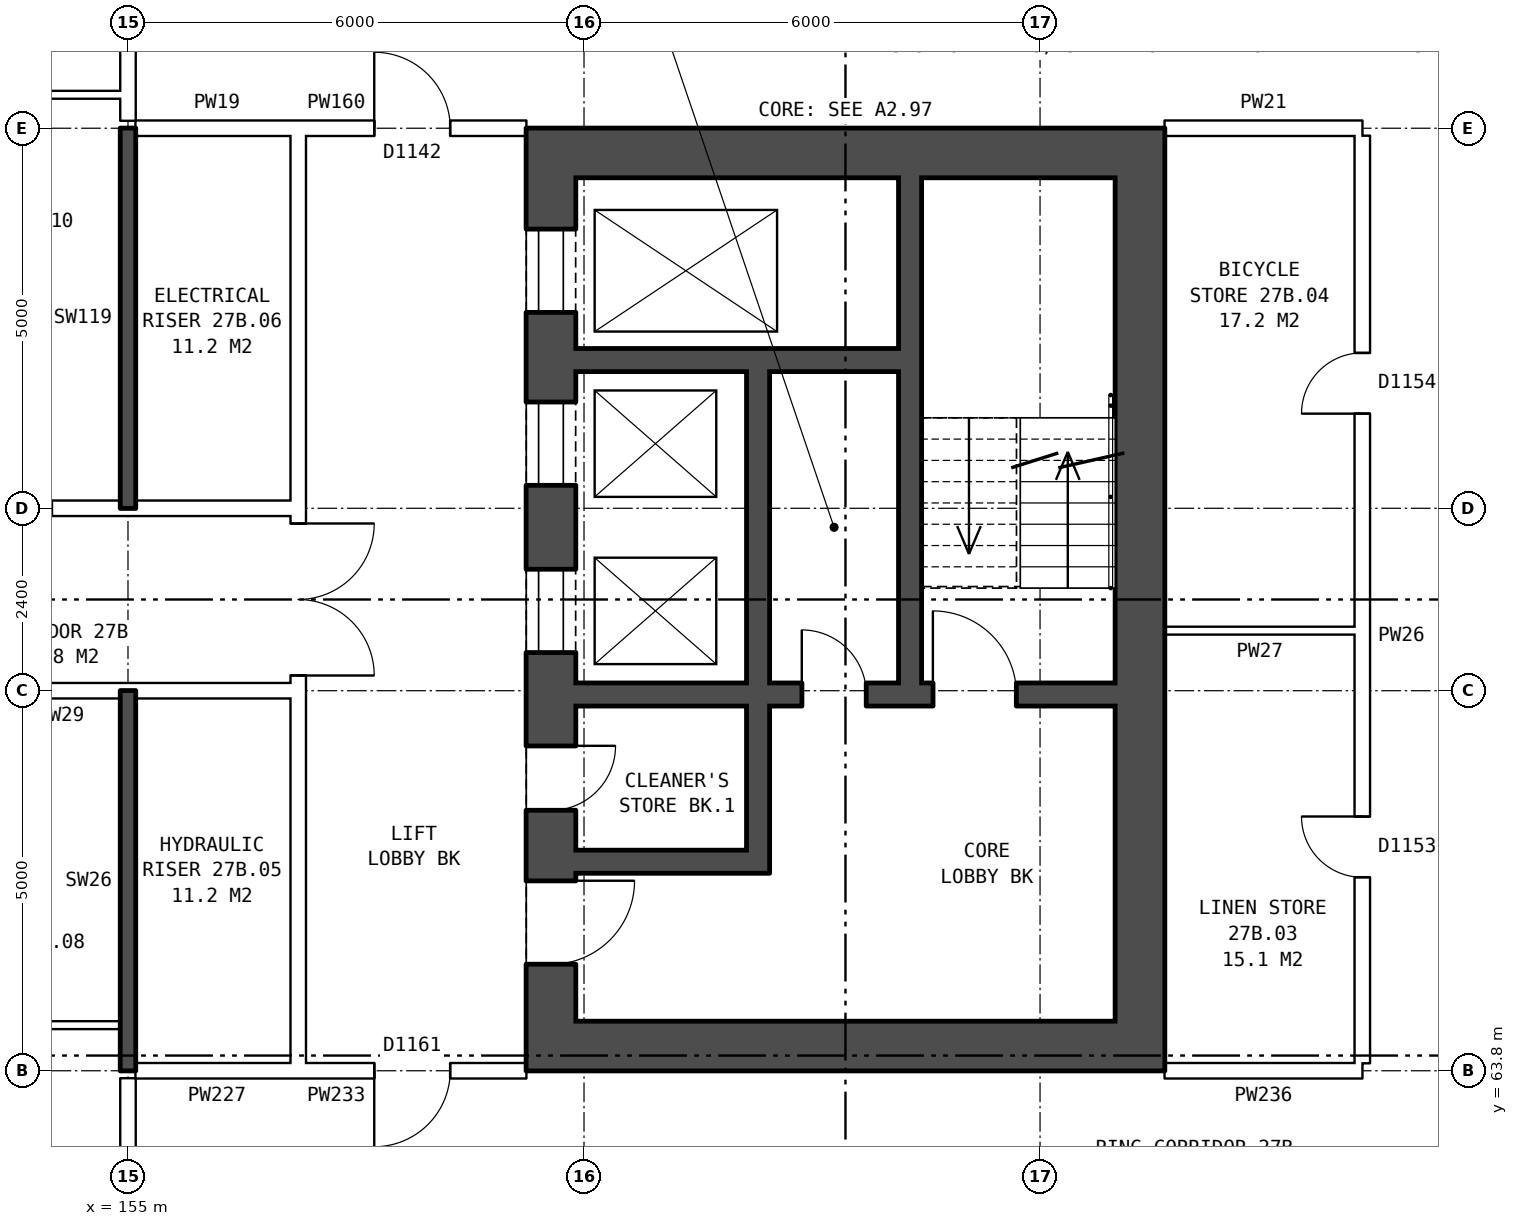
"""IFC4 building model, lengths in metres.
Left out: names, types, materials, properties, quantities, classifications, styles, units other than length and angle.
Written with IfcOpenShell. Run it as: python <this file> out.ifc"""

import sys

from ifc_helpers import new_model, si_unit, direction, frame, frame_2d, origin, place, context, subcontext, project, spatial, rectangle, extrude, element, fill, save


model = new_model("IFC4")
c1 = context("Model", 3, precision=1e-05, world=origin(), true_north=direction((0.0, 1.0)))
c2 = subcontext(c1, "Body", "Model", "MODEL_VIEW")
j1 = project(units=[si_unit("LENGTHUNIT", "METRE"), si_unit("PLANEANGLEUNIT", "RADIAN")], contexts=[c1])
p1 = place(None, origin())
s1 = spatial("IfcSite", under=j1, at=p1, CompositionType="ELEMENT")
p2 = place(p1, origin())
s2 = spatial("IfcBuilding", under=s1, at=p2, CompositionType="ELEMENT")
p3 = place(p2, frame((0.0, 0.0, 99.5)))
s3 = spatial("IfcBuildingStorey", under=s2, at=p3, CompositionType="ELEMENT", Elevation=99.5)
p4 = place(p3, frame((160.565, 75.55, 0.0), z_axis=(0.0, 0.0, 1.0), x_axis=(0.0, -1.0, 0.0)))
e1 = element("IfcWall", 1, at=p4, inside=s3, PredefinedType="SHEAR", context=c2, shape_type="SweptSolid", body=[
    extrude(rectangle(XDim=11.1, YDim=0.65, at=frame_2d((5.55, 0.0))), origin(), (0.0, 0.0, 1.0), 2.85),
])
p5 = place(p4, frame((0.675, 0.0, 0.0)))
e2 = element("IfcOpeningElement", 2, at=p5, cuts=e1, PredefinedType="OPENING", context=c2, shape_type="SweptSolid", body=[
    extrude(rectangle(XDim=1.1, YDim=2.1, at=frame_2d((0.55, 1.05))), frame((0.0, 0.335, 0.0), z_axis=(0.0, -1.0, 0.0), x_axis=(1.0, 0.0, 0.0)), (0.0, 0.0, 1.0), 0.67),
])
p6 = place(p4, frame((2.95, 0.0, 0.0)))
e3 = element("IfcOpeningElement", 3, at=p6, cuts=e1, PredefinedType="OPENING", context=c2, shape_type="SweptSolid", body=[
    extrude(rectangle(XDim=1.1, YDim=2.1, at=frame_2d((0.55, 1.05))), frame((0.0, 0.335, 0.0), z_axis=(0.0, -1.0, 0.0), x_axis=(1.0, 0.0, 0.0)), (0.0, 0.0, 1.0), 0.67),
])
p7 = place(p4, frame((5.15, 0.0, 0.0)))
e4 = element("IfcOpeningElement", 4, at=p7, cuts=e1, PredefinedType="OPENING", context=c2, shape_type="SweptSolid", body=[
    extrude(rectangle(XDim=1.1, YDim=2.1, at=frame_2d((0.55, 1.05))), frame((0.0, 0.335, 0.0), z_axis=(0.0, -1.0, 0.0), x_axis=(1.0, 0.0, 0.0)), (0.0, 0.0, 1.0), 0.67),
])
p8 = place(p4, frame((9.25, 0.0, 0.0)))
e5 = element("IfcOpeningElement", 5, at=p8, cuts=e1, PredefinedType="OPENING", context=c2, shape_type="SweptSolid", body=[
    extrude(rectangle(XDim=1.1, YDim=2.1, at=frame_2d((0.55, 1.05))), frame((0.0, 0.335, 0.0), z_axis=(0.0, -1.0, 0.0), x_axis=(1.0, 0.0, 0.0)), (0.0, 0.0, 1.0), 0.67),
])
p9 = place(p4, frame((7.475, 0.0, 0.0)))
e6 = element("IfcOpeningElement", 6, at=p9, cuts=e1, PredefinedType="OPENING", context=c2, shape_type="SweptSolid", body=[
    extrude(rectangle(XDim=0.85, YDim=2.1, at=frame_2d((0.425, 1.05))), frame((0.0, 0.335, 0.0), z_axis=(0.0, -1.0, 0.0), x_axis=(1.0, 0.0, 0.0)), (0.0, 0.0, 1.0), 0.67),
])
p10 = place(p3, frame((168.315, 75.55, 0.0), z_axis=(0.0, 0.0, 1.0), x_axis=(0.0, -1.0, 0.0)))
e7 = element("IfcWall", 7, at=p10, inside=s3, PredefinedType="SHEAR", context=c2, shape_type="SweptSolid", body=[
    extrude(rectangle(XDim=11.1, YDim=0.65, at=frame_2d((5.55, 0.0))), origin(), (0.0, 0.0, 1.0), 2.85),
])
for number, where, z_axis, x_axis in (
    (8, (160.24, 75.875, 0.0), (0.0, 0.0, 1.0), (1.0, 0.0, 0.0)),
    (9, (160.24, 64.125, 0.0), (0.0, 0.0, 1.0), (1.0, 0.0, 0.0)),
):
    element("IfcWall", number, at=place(p3, frame(where, z_axis=z_axis, x_axis=x_axis)), inside=s3, PredefinedType="SHEAR", context=c2, shape_type="SweptSolid", body=[
        extrude(rectangle(XDim=8.4, YDim=0.65, at=frame_2d((4.2, 0.0))), origin(), (0.0, 0.0, 1.0), 2.85),
    ])
p11 = place(p3, frame((160.89, 73.15, 0.0), z_axis=(0.0, 0.0, 1.0), x_axis=(1.0, 0.0, 0.0)))
e10 = element("IfcWall", 10, at=p11, inside=s3, PredefinedType="SHEAR", context=c2, shape_type="SweptSolid", body=[
    extrude(rectangle(XDim=4.25, YDim=0.3, at=frame_2d((2.125, 0.0))), origin(), (0.0, 0.0, 1.0), 2.85),
])
p12 = place(p3, frame((160.89, 68.75, 0.0), z_axis=(0.0, 0.0, 1.0), x_axis=(1.0, 0.0, 0.0)))
e11 = element("IfcWall", 11, at=p12, inside=s3, PredefinedType="SHEAR", context=c2, shape_type="SweptSolid", body=[
    extrude(rectangle(XDim=7.1, YDim=0.3, at=frame_2d((3.55, 0.0))), origin(), (0.0, 0.0, 1.0), 2.85),
])
p13 = place(p12, frame((4.7, 0.0, 0.0)))
e12 = element("IfcOpeningElement", 12, at=p13, cuts=e11, PredefinedType="OPENING", context=c2, shape_type="SweptSolid", body=[
    extrude(rectangle(XDim=1.1, YDim=2.1, at=frame_2d((0.55, 1.05))), frame((0.0, 0.16, 0.0), z_axis=(0.0, -1.0, 0.0), x_axis=(1.0, 0.0, 0.0)), (0.0, 0.0, 1.0), 0.32),
])
p14 = place(p12, frame((2.975, 0.0, 0.0)))
e13 = element("IfcOpeningElement", 13, at=p14, cuts=e11, PredefinedType="OPENING", context=c2, shape_type="SweptSolid", body=[
    extrude(rectangle(XDim=0.85, YDim=2.1, at=frame_2d((0.425, 1.05))), frame((0.0, 0.16, 0.0), z_axis=(0.0, -1.0, 0.0), x_axis=(1.0, 0.0, 0.0)), (0.0, 0.0, 1.0), 0.32),
])
p15 = place(p3, frame((160.89, 66.55, 0.0), z_axis=(0.0, 0.0, 1.0), x_axis=(1.0, 0.0, 0.0)))
e14 = element("IfcWall", 14, at=p15, inside=s3, PredefinedType="SHEAR", context=c2, shape_type="SweptSolid", body=[
    extrude(rectangle(XDim=2.25, YDim=0.3, at=frame_2d((1.125, 0.0))), origin(), (0.0, 0.0, 1.0), 2.85),
])
p16 = place(p3, frame((163.29, 73.0, 0.0), z_axis=(0.0, 0.0, 1.0), x_axis=(0.0, -1.0, 0.0)))
e15 = element("IfcWall", 15, at=p16, inside=s3, PredefinedType="SHEAR", context=c2, shape_type="SweptSolid", body=[
    extrude(rectangle(XDim=4.1, YDim=0.3, at=frame_2d((2.05, 0.0))), origin(), (0.0, 0.0, 1.0), 2.85),
])
p17 = place(p3, frame((163.29, 68.6, 0.0), z_axis=(0.0, 0.0, 1.0), x_axis=(0.0, -1.0, 0.0)))
e16 = element("IfcWall", 16, at=p17, inside=s3, PredefinedType="SHEAR", context=c2, shape_type="SweptSolid", body=[
    extrude(rectangle(XDim=2.2, YDim=0.3, at=frame_2d((1.1, 0.0))), origin(), (0.0, 0.0, 1.0), 2.85),
])
p18 = place(p3, frame((165.29, 75.55, 0.0), z_axis=(0.0, 0.0, 1.0), x_axis=(0.0, -1.0, 0.0)))
e17 = element("IfcWall", 17, at=p18, inside=s3, PredefinedType="SHEAR", context=c2, shape_type="SweptSolid", body=[
    extrude(rectangle(XDim=6.65, YDim=0.3, at=frame_2d((3.325, 0.0))), origin(), (0.0, 0.0, 1.0), 2.85),
])
p19 = place(p3, frame((157.24, 63.9, 0.0), z_axis=(0.0, 0.0, 1.0), x_axis=(0.0, 1.0, 0.0)))
e18 = element("IfcWall", 18, at=p19, inside=s3, PredefinedType="PARTITIONING", context=c2, shape_type="SweptSolid", body=[
    extrude(rectangle(XDim=12.2, YDim=0.2, at=frame_2d((6.1, 0.0))), origin(), (0.0, 0.0, 1.0), 2.85),
])
p20 = place(p19, frame((5.1, 0.0, 0.0)))
e19 = element("IfcOpeningElement", 19, at=p20, cuts=e18, PredefinedType="OPENING", context=c2, shape_type="SweptSolid", body=[
    extrude(rectangle(XDim=2.0, YDim=2.1, at=frame_2d((1.0, 1.05))), frame((0.0, 0.11, 0.0), z_axis=(0.0, -1.0, 0.0), x_axis=(1.0, 0.0, 0.0)), (0.0, 0.0, 1.0), 0.22),
])
p21 = place(p3, frame((155.1, 63.8, 0.0), z_axis=(0.0, 0.0, 1.0), x_axis=(1.0, 0.0, 0.0)))
e20 = element("IfcWall", 20, at=p21, inside=s3, PredefinedType="PARTITIONING", context=c2, shape_type="SweptSolid", body=[
    extrude(rectangle(XDim=2.14, YDim=0.2, at=frame_2d((1.07, 0.0))), origin(), (0.0, 0.0, 1.0), 2.85),
])
p22 = place(p3, frame((157.24, 63.8, 0.0), z_axis=(0.0, 0.0, 1.0), x_axis=(1.0, 0.0, 0.0)))
e21 = element("IfcWall", 21, at=p22, inside=s3, PredefinedType="PARTITIONING", context=c2, shape_type="SweptSolid", body=[
    extrude(rectangle(XDim=3.0, YDim=0.2, at=frame_2d((1.5, 0.0))), origin(), (0.0, 0.0, 1.0), 2.85),
])
p23 = place(p22, frame((1.0, 0.0, 0.0)))
e22 = element("IfcOpeningElement", 22, at=p23, cuts=e21, PredefinedType="OPENING", context=c2, shape_type="SweptSolid", body=[
    extrude(rectangle(XDim=1.0, YDim=2.1, at=frame_2d((0.5, 1.05))), frame((0.0, 0.11, 0.0), z_axis=(0.0, -1.0, 0.0), x_axis=(1.0, 0.0, 0.0)), (0.0, 0.0, 1.0), 0.22),
])
p24 = place(p3, frame((168.64, 63.8, 0.0), z_axis=(0.0, 0.0, 1.0), x_axis=(1.0, 0.0, 0.0)))
e23 = element("IfcWall", 23, at=p24, inside=s3, PredefinedType="PARTITIONING", context=c2, shape_type="SweptSolid", body=[
    extrude(rectangle(XDim=2.6, YDim=0.2, at=frame_2d((1.3, 0.0))), origin(), (0.0, 0.0, 1.0), 2.85),
])
p25 = place(p3, frame((152.0, 64.4, 0.0), z_axis=(0.0, 0.0, 1.0), x_axis=(1.0, 0.0, 0.0)))
e24 = element("IfcWall", 24, at=p25, inside=s3, PredefinedType="PARTITIONING", context=c2, shape_type="SweptSolid", body=[
    extrude(rectangle(XDim=2.9, YDim=0.1, at=frame_2d((1.45, 0.0))), origin(), (0.0, 0.0, 1.0), 2.85),
])
p26 = place(p3, frame((142.76, 68.8, 0.0), z_axis=(0.0, 0.0, 1.0), x_axis=(1.0, 0.0, 0.0)))
e25 = element("IfcWall", 25, at=p26, inside=s3, PredefinedType="PARTITIONING", context=c2, shape_type="SweptSolid", body=[
    extrude(rectangle(XDim=14.48, YDim=0.2, at=frame_2d((7.24, 0.0))), origin(), (0.0, 0.0, 1.0), 2.85),
])
p27 = place(p26, frame((4.24, 0.0, 0.0)))
e26 = element("IfcOpeningElement", 26, at=p27, cuts=e25, PredefinedType="OPENING", context=c2, shape_type="SweptSolid", body=[
    extrude(rectangle(XDim=1.0, YDim=2.1, at=frame_2d((0.5, 1.05))), frame((0.0, 0.11, 0.0), z_axis=(0.0, -1.0, 0.0), x_axis=(1.0, 0.0, 0.0)), (0.0, 0.0, 1.0), 0.22),
])
p28 = place(p26, frame((7.24, 0.0, 0.0)))
e27 = element("IfcOpeningElement", 27, at=p28, cuts=e25, PredefinedType="OPENING", context=c2, shape_type="SweptSolid", body=[
    extrude(rectangle(XDim=1.0, YDim=2.1, at=frame_2d((0.5, 1.05))), frame((0.0, 0.11, 0.0), z_axis=(0.0, -1.0, 0.0), x_axis=(1.0, 0.0, 0.0)), (0.0, 0.0, 1.0), 0.22),
])
p29 = place(p3, frame((168.64, 69.59, 0.0), z_axis=(0.0, 0.0, 1.0), x_axis=(1.0, 0.0, 0.0)))
e28 = element("IfcWall", 28, at=p29, inside=s3, PredefinedType="PARTITIONING", context=c2, shape_type="SweptSolid", body=[
    extrude(rectangle(XDim=2.5, YDim=0.1, at=frame_2d((1.25, 0.0))), origin(), (0.0, 0.0, 1.0), 2.85),
])
p30 = place(p3, frame((142.76, 71.2, 0.0), z_axis=(0.0, 0.0, 1.0), x_axis=(1.0, 0.0, 0.0)))
e29 = element("IfcWall", 29, at=p30, inside=s3, PredefinedType="PARTITIONING", context=c2, shape_type="SweptSolid", body=[
    extrude(rectangle(XDim=14.48, YDim=0.2, at=frame_2d((7.24, 0.0))), origin(), (0.0, 0.0, 1.0), 2.85),
])
p31 = place(p30, frame((1.12, 0.0, 0.0)))
e30 = element("IfcOpeningElement", 30, at=p31, cuts=e29, PredefinedType="OPENING", context=c2, shape_type="SweptSolid", body=[
    extrude(rectangle(XDim=1.0, YDim=2.1, at=frame_2d((0.5, 1.05))), frame((0.0, 0.11, 0.0), z_axis=(0.0, -1.0, 0.0), x_axis=(1.0, 0.0, 0.0)), (0.0, 0.0, 1.0), 0.22),
])
p32 = place(p30, frame((10.24, 0.0, 0.0)))
e31 = element("IfcOpeningElement", 31, at=p32, cuts=e29, PredefinedType="OPENING", context=c2, shape_type="SweptSolid", body=[
    extrude(rectangle(XDim=1.0, YDim=2.1, at=frame_2d((0.5, 1.05))), frame((0.0, 0.11, 0.0), z_axis=(0.0, -1.0, 0.0), x_axis=(1.0, 0.0, 0.0)), (0.0, 0.0, 1.0), 0.22),
])
p33 = place(p3, frame((155.1, 76.2, 0.0), z_axis=(0.0, 0.0, 1.0), x_axis=(1.0, 0.0, 0.0)))
e32 = element("IfcWall", 32, at=p33, inside=s3, PredefinedType="PARTITIONING", context=c2, shape_type="SweptSolid", body=[
    extrude(rectangle(XDim=2.14, YDim=0.2, at=frame_2d((1.07, 0.0))), origin(), (0.0, 0.0, 1.0), 2.85),
])
p34 = place(p3, frame((157.24, 76.2, 0.0), z_axis=(0.0, 0.0, 1.0), x_axis=(1.0, 0.0, 0.0)))
e33 = element("IfcWall", 33, at=p34, inside=s3, PredefinedType="PARTITIONING", context=c2, shape_type="SweptSolid", body=[
    extrude(rectangle(XDim=3.0, YDim=0.2, at=frame_2d((1.5, 0.0))), origin(), (0.0, 0.0, 1.0), 2.85),
])
p35 = place(p34, frame((1.0, 0.0, 0.0)))
e34 = element("IfcOpeningElement", 34, at=p35, cuts=e33, PredefinedType="OPENING", context=c2, shape_type="SweptSolid", body=[
    extrude(rectangle(XDim=1.0, YDim=2.1, at=frame_2d((0.5, 1.05))), frame((0.0, 0.11, 0.0), z_axis=(0.0, -1.0, 0.0), x_axis=(1.0, 0.0, 0.0)), (0.0, 0.0, 1.0), 0.22),
])
p36 = place(p3, frame((168.64, 76.2, 0.0), z_axis=(0.0, 0.0, 1.0), x_axis=(1.0, 0.0, 0.0)))
e35 = element("IfcWall", 35, at=p36, inside=s3, PredefinedType="PARTITIONING", context=c2, shape_type="SweptSolid", body=[
    extrude(rectangle(XDim=2.6, YDim=0.2, at=frame_2d((1.3, 0.0))), origin(), (0.0, 0.0, 1.0), 2.85),
])
p37 = place(p3, frame((152.0, 76.64, 0.0), z_axis=(0.0, 0.0, 1.0), x_axis=(1.0, 0.0, 0.0)))
e36 = element("IfcWall", 36, at=p37, inside=s3, PredefinedType="PARTITIONING", context=c2, shape_type="SweptSolid", body=[
    extrude(rectangle(XDim=2.9, YDim=0.1, at=frame_2d((1.45, 0.0))), origin(), (0.0, 0.0, 1.0), 2.85),
])
p38 = place(p37, frame((1.0, 0.0, 0.0)))
e37 = element("IfcOpeningElement", 37, at=p38, cuts=e36, PredefinedType="OPENING", context=c2, shape_type="SweptSolid", body=[
    extrude(rectangle(XDim=0.9, YDim=2.1, at=frame_2d((0.45, 1.05))), frame((0.0, 0.06, 0.0), z_axis=(0.0, -1.0, 0.0), x_axis=(1.0, 0.0, 0.0)), (0.0, 0.0, 1.0), 0.12),
])
p39 = place(p3, frame((155.0, 61.5, 0.0), z_axis=(0.0, 0.0, 1.0), x_axis=(0.0, 1.0, 0.0)))
e38 = element("IfcWall", 38, at=p39, inside=s3, PredefinedType="PARTITIONING", context=c2, shape_type="SweptSolid", body=[
    extrude(rectangle(XDim=2.2, YDim=0.2, at=frame_2d((1.1, 0.0))), origin(), (0.0, 0.0, 1.0), 2.85),
])
for number, where, z_axis, x_axis in (
    (39, (155.0, 63.8, 0.0), (0.0, 0.0, 1.0), (0.0, 1.0, 0.0)),
    (40, (155.0, 71.2, 0.0), (0.0, 0.0, 1.0), (0.0, 1.0, 0.0)),
):
    element("IfcWall", number, at=place(p3, frame(where, z_axis=z_axis, x_axis=x_axis)), inside=s3, PredefinedType="SOLIDWALL", context=c2, shape_type="SweptSolid", body=[
        extrude(rectangle(XDim=5.0, YDim=0.2, at=frame_2d((2.5, 0.0))), origin(), (0.0, 0.0, 1.0), 2.85),
    ])
p40 = place(p3, frame((155.0, 76.3, 0.0), z_axis=(0.0, 0.0, 1.0), x_axis=(0.0, 1.0, 0.0)))
e41 = element("IfcWall", 41, at=p40, inside=s3, PredefinedType="PARTITIONING", context=c2, shape_type="SweptSolid", body=[
    extrude(rectangle(XDim=2.2, YDim=0.2, at=frame_2d((1.1, 0.0))), origin(), (0.0, 0.0, 1.0), 2.85),
])
p41 = place(p3, frame((171.24, 63.9, 0.0), z_axis=(0.0, 0.0, 1.0), x_axis=(0.0, 1.0, 0.0)))
e42 = element("IfcWall", 42, at=p41, inside=s3, PredefinedType="PARTITIONING", context=c2, shape_type="SweptSolid", body=[
    extrude(rectangle(XDim=12.2, YDim=0.2, at=frame_2d((6.1, 0.0))), origin(), (0.0, 0.0, 1.0), 2.85),
])
p42 = place(p41, frame((2.445, 0.0, 0.0)))
e43 = element("IfcOpeningElement", 43, at=p42, cuts=e42, PredefinedType="OPENING", context=c2, shape_type="SweptSolid", body=[
    extrude(rectangle(XDim=0.8, YDim=2.1, at=frame_2d((0.4, 1.05))), frame((0.0, 0.11, 0.0), z_axis=(0.0, -1.0, 0.0), x_axis=(1.0, 0.0, 0.0)), (0.0, 0.0, 1.0), 0.22),
])
p43 = place(p41, frame((8.545, 0.0, 0.0)))
e44 = element("IfcOpeningElement", 44, at=p43, cuts=e42, PredefinedType="OPENING", context=c2, shape_type="SweptSolid", body=[
    extrude(rectangle(XDim=0.8, YDim=2.1, at=frame_2d((0.4, 1.05))), frame((0.0, 0.11, 0.0), z_axis=(0.0, -1.0, 0.0), x_axis=(1.0, 0.0, 0.0)), (0.0, 0.0, 1.0), 0.22),
])
p44 = place(p5, origin())
e45 = element("IfcDoor", 45, at=p44, inside=s3, OperationType="DOUBLE_DOOR_SLIDING", PredefinedType="DOOR", context=c2, shape_type="SweptSolid", body=[
    extrude(rectangle(XDim=1.1, YDim=2.1, at=frame_2d((0.55, 1.05))), frame((0.0, 0.31, 0.0), z_axis=(0.0, -1.0, 0.0), x_axis=(1.0, 0.0, 0.0)), (0.0, 0.0, 1.0), 0.05),
])
fill(e2, e45)
p45 = place(p6, origin())
e46 = element("IfcDoor", 46, at=p45, inside=s3, OperationType="DOUBLE_DOOR_SLIDING", PredefinedType="DOOR", context=c2, shape_type="SweptSolid", body=[
    extrude(rectangle(XDim=1.1, YDim=2.1, at=frame_2d((0.55, 1.05))), frame((0.0, 0.31, 0.0), z_axis=(0.0, -1.0, 0.0), x_axis=(1.0, 0.0, 0.0)), (0.0, 0.0, 1.0), 0.05),
])
fill(e3, e46)
p46 = place(p7, origin())
e47 = element("IfcDoor", 47, at=p46, inside=s3, OperationType="DOUBLE_DOOR_SLIDING", PredefinedType="DOOR", context=c2, shape_type="SweptSolid", body=[
    extrude(rectangle(XDim=1.1, YDim=2.1, at=frame_2d((0.55, 1.05))), frame((0.0, 0.31, 0.0), z_axis=(0.0, -1.0, 0.0), x_axis=(1.0, 0.0, 0.0)), (0.0, 0.0, 1.0), 0.05),
])
fill(e4, e47)
p47 = place(p8, origin())
e48 = element("IfcDoor", 48, at=p47, inside=s3, OperationType="SINGLE_SWING_LEFT", PredefinedType="DOOR", context=c2, shape_type="SweptSolid", body=[
    extrude(rectangle(XDim=1.1, YDim=2.1, at=frame_2d((0.55, 1.05))), frame((0.0, 0.31, 0.0), z_axis=(0.0, -1.0, 0.0), x_axis=(1.0, 0.0, 0.0)), (0.0, 0.0, 1.0), 0.05),
])
fill(e5, e48)
p48 = place(p13, origin())
e49 = element("IfcDoor", 49, at=p48, inside=s3, OperationType="SINGLE_SWING_LEFT", PredefinedType="DOOR", context=c2, shape_type="SweptSolid", body=[
    extrude(rectangle(XDim=1.1, YDim=2.1, at=frame_2d((0.55, 1.05))), frame((0.0, 0.025, 0.0), z_axis=(0.0, -1.0, 0.0), x_axis=(1.0, 0.0, 0.0)), (0.0, 0.0, 1.0), 0.05),
])
fill(e12, e49)
p49 = place(p9, origin())
e50 = element("IfcDoor", 50, at=p49, inside=s3, OperationType="SINGLE_SWING_LEFT", PredefinedType="DOOR", context=c2, shape_type="SweptSolid", body=[
    extrude(rectangle(XDim=0.85, YDim=2.1, at=frame_2d((0.425, 1.05))), frame((0.0, 0.31, 0.0), z_axis=(0.0, -1.0, 0.0), x_axis=(1.0, 0.0, 0.0)), (0.0, 0.0, 1.0), 0.05),
])
fill(e6, e50)
p50 = place(p14, origin())
e51 = element("IfcDoor", 51, at=p50, inside=s3, OperationType="SINGLE_SWING_LEFT", PredefinedType="DOOR", context=c2, shape_type="SweptSolid", body=[
    extrude(rectangle(XDim=0.85, YDim=2.1, at=frame_2d((0.425, 1.05))), frame((0.0, 0.025, 0.0), z_axis=(0.0, -1.0, 0.0), x_axis=(1.0, 0.0, 0.0)), (0.0, 0.0, 1.0), 0.05),
])
fill(e13, e51)
p51 = place(p20, frame((2.0, 0.0, 0.0), z_axis=(0.0, 0.0, 1.0), x_axis=(-1.0, 0.0, 0.0)))
e52 = element("IfcDoor", 52, at=p51, inside=s3, OperationType="DOUBLE_DOOR_SINGLE_SWING", PredefinedType="DOOR", context=c2, shape_type="SweptSolid", body=[
    extrude(rectangle(XDim=2.0, YDim=2.1, at=frame_2d((1.0, 1.05))), frame((0.0, 0.025, 0.0), z_axis=(0.0, -1.0, 0.0), x_axis=(1.0, 0.0, 0.0)), (0.0, 0.0, 1.0), 0.05),
])
fill(e19, e52)
p52 = place(p23, frame((1.0, 0.0, 0.0), z_axis=(0.0, 0.0, 1.0), x_axis=(-1.0, 0.0, 0.0)))
e53 = element("IfcDoor", 53, at=p52, inside=s3, OperationType="SINGLE_SWING_RIGHT", PredefinedType="DOOR", context=c2, shape_type="SweptSolid", body=[
    extrude(rectangle(XDim=1.0, YDim=2.1, at=frame_2d((0.5, 1.05))), frame((0.0, 0.025, 0.0), z_axis=(0.0, -1.0, 0.0), x_axis=(1.0, 0.0, 0.0)), (0.0, 0.0, 1.0), 0.05),
])
fill(e22, e53)
p53 = place(p35, origin())
e54 = element("IfcDoor", 54, at=p53, inside=s3, OperationType="SINGLE_SWING_LEFT", PredefinedType="DOOR", context=c2, shape_type="SweptSolid", body=[
    extrude(rectangle(XDim=1.0, YDim=2.1, at=frame_2d((0.5, 1.05))), frame((0.0, 0.025, 0.0), z_axis=(0.0, -1.0, 0.0), x_axis=(1.0, 0.0, 0.0)), (0.0, 0.0, 1.0), 0.05),
])
fill(e34, e54)
p54 = place(p42, origin())
e55 = element("IfcDoor", 55, at=p54, inside=s3, OperationType="SINGLE_SWING_RIGHT", PredefinedType="DOOR", context=c2, shape_type="SweptSolid", body=[
    extrude(rectangle(XDim=0.8, YDim=2.1, at=frame_2d((0.4, 1.05))), frame((0.0, 0.025, 0.0), z_axis=(0.0, -1.0, 0.0), x_axis=(1.0, 0.0, 0.0)), (0.0, 0.0, 1.0), 0.05),
])
fill(e43, e55)
p55 = place(p43, origin())
e56 = element("IfcDoor", 56, at=p55, inside=s3, OperationType="SINGLE_SWING_LEFT", PredefinedType="DOOR", context=c2, shape_type="SweptSolid", body=[
    extrude(rectangle(XDim=0.8, YDim=2.1, at=frame_2d((0.4, 1.05))), frame((0.0, 0.025, 0.0), z_axis=(0.0, -1.0, 0.0), x_axis=(1.0, 0.0, 0.0)), (0.0, 0.0, 1.0), 0.05),
])
fill(e44, e56)
save(model, sys.argv[1])
